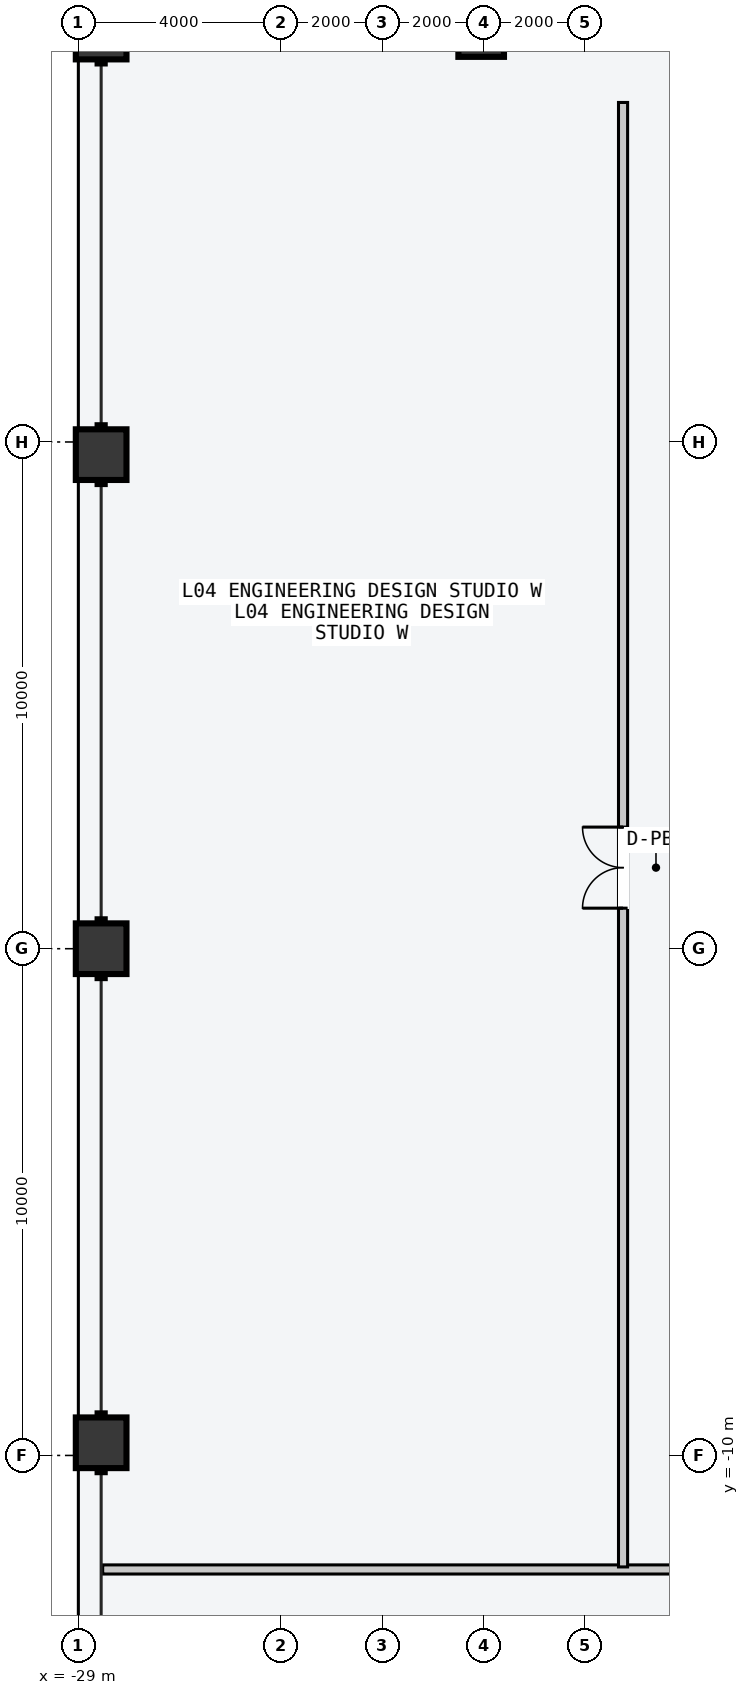
"""IFC4 building model, lengths in metres.
Left out: names, types, materials, properties, quantities, classifications, styles, units other than length and angle.
Written with IfcOpenShell. Run it as: python <this file> out.ifc"""

import sys

from ifc_helpers import new_model, si_unit, direction, frame, frame_2d, origin, origin_2d, place, context, subcontext, project, spatial, rectangle, hollow_rectangle, extrude, element, fill, save


model = new_model("IFC4")
c1 = context("Model", 3, precision=1e-05, world=origin(), true_north=direction((0.0, 1.0)))
c2 = subcontext(c1, "Body", "Model", "MODEL_VIEW")
j1 = project(units=[si_unit("LENGTHUNIT", "METRE"), si_unit("PLANEANGLEUNIT", "RADIAN")], contexts=[c1])
p1 = place(None, origin())
s1 = spatial("IfcSite", under=j1, at=p1, CompositionType="ELEMENT")
p2 = place(p1, origin())
s2 = spatial("IfcBuilding", under=s1, at=p2, CompositionType="ELEMENT")
p3 = place(p2, frame((0.0, 0.0, 19.2)))
s3 = spatial("IfcBuildingStorey", under=s2, at=p3, CompositionType="ELEMENT", Elevation=19.2)
p4 = place(p3, frame((-21.05, 18.05, 0.0), z_axis=(0.0, 0.0, 1.0), x_axis=(1.0, 0.0, 0.0)))
e1 = element("IfcColumn", 1, at=p4, inside=s3, PredefinedType="COLUMN", context=c2, shape_type="SweptSolid", body=[
    extrude(hollow_rectangle(XDim=0.9, YDim=0.9, WallThickness=0.045, at=origin_2d()), origin(), (0.0, 0.0, 1.0), 4.8),
])
for number, where, z_axis, x_axis in (
    (2, (-28.55, -9.75, 0.0), (0.0, 0.0, 1.0), (0.0, 1.0, 0.0)),
    (3, (-28.55, 0.0, 0.0), (0.0, 0.0, 1.0), (0.0, 1.0, 0.0)),
    (4, (-28.55, 9.75, 0.0), (0.0, 0.0, 1.0), (0.0, 1.0, 0.0)),
    (5, (-28.55, 18.05, 0.0), (0.0, 0.0, 1.0), (0.0, 1.0, 0.0)),
):
    element("IfcColumn", number, at=place(p3, frame(where, z_axis=z_axis, x_axis=x_axis)), inside=s3, PredefinedType="COLUMN", context=c2, shape_type="SweptSolid", body=[
        extrude(hollow_rectangle(XDim=1.0, YDim=1.0, WallThickness=0.05, at=origin_2d()), origin(), (0.0, 0.0, 1.0), 4.8),
    ])
p5 = place(p3, frame((-28.52, -12.25, 0.0), z_axis=(0.0, 0.0, 1.0), x_axis=(1.0, 0.0, 0.0)))
e6 = element("IfcWall", 6, at=p5, inside=s3, PredefinedType="PARTITIONING", context=c2, shape_type="SweptSolid", body=[
    extrude(rectangle(XDim=57.04, YDim=0.18, at=frame_2d((28.52, 0.0))), origin(), (0.0, 0.0, 1.0), 4.6),
])
p6 = place(p5, frame((11.52, 0.0, 0.0)))
e7 = element("IfcOpeningElement", 7, at=p6, cuts=e6, PredefinedType="OPENING", context=c2, shape_type="SweptSolid", body=[
    extrude(rectangle(XDim=1.6, YDim=2.3, at=frame_2d((0.8, 1.15))), frame((0.0, 0.1, 0.0), z_axis=(0.0, -1.0, 0.0), x_axis=(1.0, 0.0, 0.0)), (0.0, 0.0, 1.0), 0.2),
])
p7 = place(p5, frame((20.59, 0.0, 0.0)))
e8 = element("IfcOpeningElement", 8, at=p7, cuts=e6, PredefinedType="OPENING", context=c2, shape_type="SweptSolid", body=[
    extrude(rectangle(XDim=1.6, YDim=2.3, at=frame_2d((0.8, 1.15))), frame((0.0, 0.1, 0.0), z_axis=(0.0, -1.0, 0.0), x_axis=(1.0, 0.0, 0.0)), (0.0, 0.0, 1.0), 0.2),
])
p8 = place(p5, frame((34.85, 0.0, 0.0)))
e9 = element("IfcOpeningElement", 9, at=p8, cuts=e6, PredefinedType="OPENING", context=c2, shape_type="SweptSolid", body=[
    extrude(rectangle(XDim=1.6, YDim=2.3, at=frame_2d((0.8, 1.15))), frame((0.0, 0.1, 0.0), z_axis=(0.0, -1.0, 0.0), x_axis=(1.0, 0.0, 0.0)), (0.0, 0.0, 1.0), 0.2),
])
p9 = place(p5, frame((43.92, 0.0, 0.0)))
e10 = element("IfcOpeningElement", 10, at=p9, cuts=e6, PredefinedType="OPENING", context=c2, shape_type="SweptSolid", body=[
    extrude(rectangle(XDim=1.6, YDim=2.3, at=frame_2d((0.8, 1.15))), frame((0.0, 0.1, 0.0), z_axis=(0.0, -1.0, 0.0), x_axis=(1.0, 0.0, 0.0)), (0.0, 0.0, 1.0), 0.2),
])
p10 = place(p3, frame((-18.25, -12.2, 0.0), z_axis=(0.0, 0.0, 1.0), x_axis=(0.0, 1.0, 0.0)))
e11 = element("IfcWall", 11, at=p10, inside=s3, PredefinedType="PARTITIONING", context=c2, shape_type="SweptSolid", body=[
    extrude(rectangle(XDim=28.9, YDim=0.18, at=frame_2d((14.45, 0.0))), origin(), (0.0, 0.0, 1.0), 4.6),
])
p11 = place(p10, frame((13.0, 0.0, 0.0)))
e12 = element("IfcOpeningElement", 12, at=p11, cuts=e11, PredefinedType="OPENING", context=c2, shape_type="SweptSolid", body=[
    extrude(rectangle(XDim=1.6, YDim=2.3, at=frame_2d((0.8, 1.15))), frame((0.0, 0.1, 0.0), z_axis=(0.0, -1.0, 0.0), x_axis=(1.0, 0.0, 0.0)), (0.0, 0.0, 1.0), 0.2),
])
p12 = place(p11, origin())
e13 = element("IfcDoor", 13, at=p12, inside=s3, OperationType="DOUBLE_DOOR_SINGLE_SWING", PredefinedType="DOOR", context=c2, shape_type="SweptSolid", body=[
    extrude(rectangle(XDim=1.6, YDim=2.3, at=frame_2d((0.8, 1.15))), frame((0.0, 0.025, 0.0), z_axis=(0.0, -1.0, 0.0), x_axis=(1.0, 0.0, 0.0)), (0.0, 0.0, 1.0), 0.05),
])
fill(e12, e13)
save(model, sys.argv[1])
